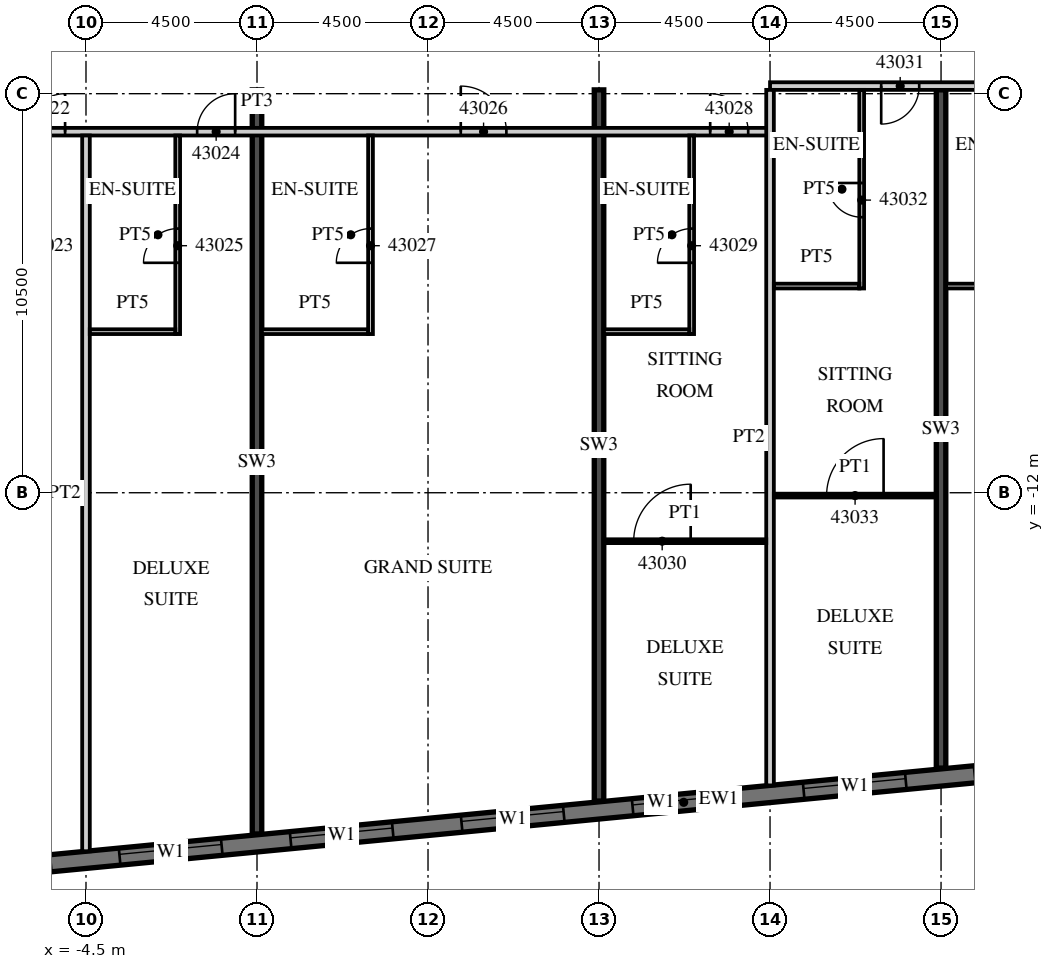
"""IFC4 building model, lengths in metres.
Left out: names, types, materials, properties, quantities, classifications, styles, units other than length and angle.
Written with IfcOpenShell. Run it as: python <this file> out.ifc"""

import sys

from ifc_helpers import new_model, si_unit, direction, frame, frame_2d, origin, place, context, subcontext, project, spatial, rectangle, extrude, element, fill, save


model = new_model("IFC4")
c1 = context("Model", 3, precision=1e-05, world=origin(), true_north=direction((0.0, 1.0)))
c2 = subcontext(c1, "Body", "Model", "MODEL_VIEW")
j1 = project(units=[si_unit("LENGTHUNIT", "METRE"), si_unit("PLANEANGLEUNIT", "RADIAN")], contexts=[c1])
p1 = place(None, origin())
s1 = spatial("IfcSite", under=j1, at=p1, CompositionType="ELEMENT")
p2 = place(p1, origin())
s2 = spatial("IfcBuilding", under=s1, at=p2, CompositionType="ELEMENT")
p3 = place(p2, frame((0.0, 0.0, 183.4)))
s3 = spatial("IfcBuildingStorey", under=s2, at=p3, CompositionType="ELEMENT", Elevation=183.4)
p4 = place(p3, frame((0.0, -20.979, 0.0), z_axis=(0.0, 0.0, 1.0), x_axis=(0.0, 1.0, 0.0)))
e1 = element("IfcWall", 1, at=p4, inside=s3, PredefinedType="SHEAR", context=c2, shape_type="SweptSolid", body=[
    extrude(rectangle(XDim=19.579, YDim=0.25, at=frame_2d((9.789, 0.0))), origin(), (0.0, 0.0, 1.0), 3.3),
])
p5 = place(p3, frame((9.0, -20.112, 0.0), z_axis=(0.0, 0.0, 1.0), x_axis=(0.0, 1.0, 0.0)))
e2 = element("IfcWall", 2, at=p5, inside=s3, PredefinedType="SHEAR", context=c2, shape_type="SweptSolid", body=[
    extrude(rectangle(XDim=18.712, YDim=0.25, at=frame_2d((9.356, 0.0))), origin(), (0.0, 0.0, 1.0), 3.3),
])
p6 = place(p3, frame((18.0, -19.245, 0.0), z_axis=(0.0, 0.0, 1.0), x_axis=(0.0, 1.0, 0.0)))
e3 = element("IfcWall", 3, at=p6, inside=s3, PredefinedType="SHEAR", context=c2, shape_type="SweptSolid", body=[
    extrude(rectangle(XDim=17.845, YDim=0.25, at=frame_2d((8.923, 0.0))), origin(), (0.0, 0.0, 1.0), 3.3),
])
p7 = place(p3, frame((-13.521, -22.529, 0.0), z_axis=(0.0, 0.0, 1.0), x_axis=(0.995396436651, 0.095843277819, 0.0)))
e4 = element("IfcWall", 4, at=p7, inside=s3, PredefinedType="SOLIDWALL", context=c2, shape_type="SweptSolid", body=[
    extrude(rectangle(XDim=51.578, YDim=0.45, at=frame_2d((25.789, 0.0))), origin(), (0.0, 0.0, 1.0), 3.02),
])
p8 = place(p7, frame((0.91, 0.0, 0.45)))
e5 = element("IfcOpeningElement", 5, at=p8, cuts=e4, PredefinedType="OPENING", context=c2, shape_type="SweptSolid", body=[
    extrude(rectangle(XDim=2.7, YDim=2.25, at=frame_2d((1.35, 1.125))), frame((0.0, 0.235, 0.0), z_axis=(0.0, -1.0, 0.0), x_axis=(1.0, 0.0, 0.0)), (0.0, 0.0, 1.0), 0.47),
])
p9 = place(p7, frame((5.431, 0.0, 0.45)))
e6 = element("IfcOpeningElement", 6, at=p9, cuts=e4, PredefinedType="OPENING", context=c2, shape_type="SweptSolid", body=[
    extrude(rectangle(XDim=2.7, YDim=2.25, at=frame_2d((1.35, 1.125))), frame((0.0, 0.235, 0.0), z_axis=(0.0, -1.0, 0.0), x_axis=(1.0, 0.0, 0.0)), (0.0, 0.0, 1.0), 0.47),
])
p10 = place(p7, frame((9.952, 0.0, 0.45)))
e7 = element("IfcOpeningElement", 7, at=p10, cuts=e4, PredefinedType="OPENING", context=c2, shape_type="SweptSolid", body=[
    extrude(rectangle(XDim=2.7, YDim=2.25, at=frame_2d((1.35, 1.125))), frame((0.0, 0.235, 0.0), z_axis=(0.0, -1.0, 0.0), x_axis=(1.0, 0.0, 0.0)), (0.0, 0.0, 1.0), 0.47),
])
p11 = place(p7, frame((14.473, 0.0, 0.45)))
e8 = element("IfcOpeningElement", 8, at=p11, cuts=e4, PredefinedType="OPENING", context=c2, shape_type="SweptSolid", body=[
    extrude(rectangle(XDim=2.7, YDim=2.25, at=frame_2d((1.35, 1.125))), frame((0.0, 0.235, 0.0), z_axis=(0.0, -1.0, 0.0), x_axis=(1.0, 0.0, 0.0)), (0.0, 0.0, 1.0), 0.47),
])
p12 = place(p7, frame((18.994, 0.0, 0.45)))
e9 = element("IfcOpeningElement", 9, at=p12, cuts=e4, PredefinedType="OPENING", context=c2, shape_type="SweptSolid", body=[
    extrude(rectangle(XDim=2.7, YDim=2.25, at=frame_2d((1.35, 1.125))), frame((0.0, 0.235, 0.0), z_axis=(0.0, -1.0, 0.0), x_axis=(1.0, 0.0, 0.0)), (0.0, 0.0, 1.0), 0.47),
])
p13 = place(p7, frame((23.514, 0.0, 0.45)))
e10 = element("IfcOpeningElement", 10, at=p13, cuts=e4, PredefinedType="OPENING", context=c2, shape_type="SweptSolid", body=[
    extrude(rectangle(XDim=2.7, YDim=2.25, at=frame_2d((1.35, 1.125))), frame((0.0, 0.235, 0.0), z_axis=(0.0, -1.0, 0.0), x_axis=(1.0, 0.0, 0.0)), (0.0, 0.0, 1.0), 0.47),
])
p14 = place(p7, frame((28.035, 0.0, 0.45)))
e11 = element("IfcOpeningElement", 11, at=p14, cuts=e4, PredefinedType="OPENING", context=c2, shape_type="SweptSolid", body=[
    extrude(rectangle(XDim=2.7, YDim=2.25, at=frame_2d((1.35, 1.125))), frame((0.0, 0.235, 0.0), z_axis=(0.0, -1.0, 0.0), x_axis=(1.0, 0.0, 0.0)), (0.0, 0.0, 1.0), 0.47),
])
p15 = place(p7, frame((32.556, 0.0, 0.45)))
e12 = element("IfcOpeningElement", 12, at=p15, cuts=e4, PredefinedType="OPENING", context=c2, shape_type="SweptSolid", body=[
    extrude(rectangle(XDim=2.7, YDim=2.25, at=frame_2d((1.35, 1.125))), frame((0.0, 0.235, 0.0), z_axis=(0.0, -1.0, 0.0), x_axis=(1.0, 0.0, 0.0)), (0.0, 0.0, 1.0), 0.47),
])
p16 = place(p7, frame((37.077, 0.0, 0.45)))
e13 = element("IfcOpeningElement", 13, at=p16, cuts=e4, PredefinedType="OPENING", context=c2, shape_type="SweptSolid", body=[
    extrude(rectangle(XDim=2.7, YDim=2.25, at=frame_2d((1.35, 1.125))), frame((0.0, 0.235, 0.0), z_axis=(0.0, -1.0, 0.0), x_axis=(1.0, 0.0, 0.0)), (0.0, 0.0, 1.0), 0.47),
])
p17 = place(p7, frame((41.598, 0.0, 0.45)))
e14 = element("IfcOpeningElement", 14, at=p17, cuts=e4, PredefinedType="OPENING", context=c2, shape_type="SweptSolid", body=[
    extrude(rectangle(XDim=2.7, YDim=2.25, at=frame_2d((1.35, 1.125))), frame((0.0, 0.235, 0.0), z_axis=(0.0, -1.0, 0.0), x_axis=(1.0, 0.0, 0.0)), (0.0, 0.0, 1.0), 0.47),
])
p18 = place(p7, frame((46.119, 0.0, 0.45)))
e15 = element("IfcOpeningElement", 15, at=p18, cuts=e4, PredefinedType="OPENING", context=c2, shape_type="SweptSolid", body=[
    extrude(rectangle(XDim=2.7, YDim=2.25, at=frame_2d((1.35, 1.125))), frame((0.0, 0.235, 0.0), z_axis=(0.0, -1.0, 0.0), x_axis=(1.0, 0.0, 0.0)), (0.0, 0.0, 1.0), 0.47),
])
p19 = place(p3, frame((-13.5, -2.5, 0.0), z_axis=(0.0, 0.0, 1.0), x_axis=(1.0, 0.0, 0.0)))
e16 = element("IfcWall", 16, at=p19, inside=s3, PredefinedType="PARTITIONING", context=c2, shape_type="SweptSolid", body=[
    extrude(rectangle(XDim=27.0, YDim=0.2, at=frame_2d((13.5, 0.0))), origin(), (0.0, 0.0, 1.0), 3.02),
])
p20 = place(p19, frame((2.925, 0.0, 0.0)))
e17 = element("IfcOpeningElement", 17, at=p20, cuts=e16, PredefinedType="OPENING", context=c2, shape_type="SweptSolid", body=[
    extrude(rectangle(XDim=1.0, YDim=2.1, at=frame_2d((0.5, 1.05))), frame((0.0, 0.11, 0.0), z_axis=(0.0, -1.0, 0.0), x_axis=(1.0, 0.0, 0.0)), (0.0, 0.0, 1.0), 0.22),
])
p21 = place(p19, frame((7.45, 0.0, 0.0)))
e18 = element("IfcOpeningElement", 18, at=p21, cuts=e16, PredefinedType="OPENING", context=c2, shape_type="SweptSolid", body=[
    extrude(rectangle(XDim=1.0, YDim=2.1, at=frame_2d((0.5, 1.05))), frame((0.0, 0.11, 0.0), z_axis=(0.0, -1.0, 0.0), x_axis=(1.0, 0.0, 0.0)), (0.0, 0.0, 1.0), 0.22),
])
p22 = place(p19, frame((11.925, 0.0, 0.0)))
e19 = element("IfcOpeningElement", 19, at=p22, cuts=e16, PredefinedType="OPENING", context=c2, shape_type="SweptSolid", body=[
    extrude(rectangle(XDim=1.0, YDim=2.1, at=frame_2d((0.5, 1.05))), frame((0.0, 0.11, 0.0), z_axis=(0.0, -1.0, 0.0), x_axis=(1.0, 0.0, 0.0)), (0.0, 0.0, 1.0), 0.22),
])
p23 = place(p19, frame((18.862, 0.0, 0.0)))
e20 = element("IfcOpeningElement", 20, at=p23, cuts=e16, PredefinedType="OPENING", context=c2, shape_type="SweptSolid", body=[
    extrude(rectangle(XDim=1.2, YDim=2.1, at=frame_2d((0.6, 1.05))), frame((0.0, 0.11, 0.0), z_axis=(0.0, -1.0, 0.0), x_axis=(1.0, 0.0, 0.0)), (0.0, 0.0, 1.0), 0.22),
])
p24 = place(p19, frame((25.425, 0.0, 0.0)))
e21 = element("IfcOpeningElement", 21, at=p24, cuts=e16, PredefinedType="OPENING", context=c2, shape_type="SweptSolid", body=[
    extrude(rectangle(XDim=1.0, YDim=2.1, at=frame_2d((0.5, 1.05))), frame((0.0, 0.11, 0.0), z_axis=(0.0, -1.0, 0.0), x_axis=(1.0, 0.0, 0.0)), (0.0, 0.0, 1.0), 0.22),
])
p25 = place(p3, frame((13.5, -1.3, 0.0), z_axis=(0.0, 0.0, 1.0), x_axis=(1.0, 0.0, 0.0)))
e22 = element("IfcWall", 22, at=p25, inside=s3, PredefinedType="PARTITIONING", context=c2, shape_type="SweptSolid", body=[
    extrude(rectangle(XDim=26.317, YDim=0.2, at=frame_2d((13.158, 0.0))), origin(), (0.0, 0.0, 1.0), 3.02),
])
p26 = place(p25, frame((2.925, 0.0, 0.0)))
e23 = element("IfcOpeningElement", 23, at=p26, cuts=e22, PredefinedType="OPENING", context=c2, shape_type="SweptSolid", body=[
    extrude(rectangle(XDim=1.0, YDim=2.1, at=frame_2d((0.5, 1.05))), frame((0.0, 0.11, 0.0), z_axis=(0.0, -1.0, 0.0), x_axis=(1.0, 0.0, 0.0)), (0.0, 0.0, 1.0), 0.22),
])
p27 = place(p25, frame((9.862, 0.0, 0.0)))
e24 = element("IfcOpeningElement", 24, at=p27, cuts=e22, PredefinedType="OPENING", context=c2, shape_type="SweptSolid", body=[
    extrude(rectangle(XDim=1.2, YDim=2.1, at=frame_2d((0.6, 1.05))), frame((0.0, 0.11, 0.0), z_axis=(0.0, -1.0, 0.0), x_axis=(1.0, 0.0, 0.0)), (0.0, 0.0, 1.0), 0.22),
])
p28 = place(p25, frame((15.938, 0.0, 0.0)))
e25 = element("IfcOpeningElement", 25, at=p28, cuts=e22, PredefinedType="OPENING", context=c2, shape_type="SweptSolid", body=[
    extrude(rectangle(XDim=1.2, YDim=2.1, at=frame_2d((0.6, 1.05))), frame((0.0, 0.11, 0.0), z_axis=(0.0, -1.0, 0.0), x_axis=(1.0, 0.0, 0.0)), (0.0, 0.0, 1.0), 0.22),
])
p29 = place(p25, frame((25.208, 0.0, 0.0)))
e26 = element("IfcOpeningElement", 26, at=p29, cuts=e22, PredefinedType="OPENING", context=c2, shape_type="SweptSolid", body=[
    extrude(rectangle(XDim=0.9, YDim=2.1, at=frame_2d((0.45, 1.05))), frame((0.0, 0.11, 0.0), z_axis=(0.0, -1.0, 0.0), x_axis=(1.0, 0.0, 0.0)), (0.0, 0.0, 1.0), 0.22),
])
p30 = place(p3, frame((-4.5, -21.434, 0.0), z_axis=(0.0, 0.0, 1.0), x_axis=(0.0, 1.0, 0.0)))
e27 = element("IfcWall", 27, at=p30, inside=s3, PredefinedType="PARTITIONING", context=c2, shape_type="SweptSolid", body=[
    extrude(rectangle(XDim=18.834, YDim=0.2, at=frame_2d((9.417, 0.0))), origin(), (0.0, 0.0, 1.0), 3.02),
])
p31 = place(p3, frame((-2.087, -7.825, 0.0), z_axis=(0.0, 0.0, 1.0), x_axis=(0.0, 1.0, 0.0)))
e28 = element("IfcWall", 28, at=p31, inside=s3, PredefinedType="PARTITIONING", context=c2, shape_type="SweptSolid", body=[
    extrude(rectangle(XDim=5.225, YDim=0.125, at=frame_2d((2.612, 0.0))), origin(), (0.0, 0.0, 1.0), 3.02),
])
p32 = place(p31, frame((1.875, 0.0, 0.0)))
e29 = element("IfcOpeningElement", 29, at=p32, cuts=e28, PredefinedType="OPENING", context=c2, shape_type="SweptSolid", body=[
    extrude(rectangle(XDim=0.9, YDim=2.1, at=frame_2d((0.45, 1.05))), frame((0.0, 0.073, 0.0), z_axis=(0.0, -1.0, 0.0), x_axis=(1.0, 0.0, 0.0)), (0.0, 0.0, 1.0), 0.145),
])
p33 = place(p3, frame((-4.4, -7.762, 0.0), z_axis=(0.0, 0.0, 1.0), x_axis=(1.0, 0.0, 0.0)))
e30 = element("IfcWall", 30, at=p33, inside=s3, PredefinedType="PARTITIONING", context=c2, shape_type="SweptSolid", body=[
    extrude(rectangle(XDim=2.25, YDim=0.125, at=frame_2d((1.125, 0.0))), origin(), (0.0, 0.0, 1.0), 3.02),
])
p34 = place(p3, frame((2.987, -7.825, 0.0), z_axis=(0.0, 0.0, 1.0), x_axis=(0.0, 1.0, 0.0)))
e31 = element("IfcWall", 31, at=p34, inside=s3, PredefinedType="PARTITIONING", context=c2, shape_type="SweptSolid", body=[
    extrude(rectangle(XDim=5.225, YDim=0.125, at=frame_2d((2.612, 0.0))), origin(), (0.0, 0.0, 1.0), 3.02),
])
p35 = place(p34, frame((1.875, 0.0, 0.0)))
e32 = element("IfcOpeningElement", 32, at=p35, cuts=e31, PredefinedType="OPENING", context=c2, shape_type="SweptSolid", body=[
    extrude(rectangle(XDim=0.9, YDim=2.1, at=frame_2d((0.45, 1.05))), frame((0.0, 0.073, 0.0), z_axis=(0.0, -1.0, 0.0), x_axis=(1.0, 0.0, 0.0)), (0.0, 0.0, 1.0), 0.145),
])
p36 = place(p3, frame((0.125, -7.762, 0.0), z_axis=(0.0, 0.0, 1.0), x_axis=(1.0, 0.0, 0.0)))
e33 = element("IfcWall", 33, at=p36, inside=s3, PredefinedType="PARTITIONING", context=c2, shape_type="SweptSolid", body=[
    extrude(rectangle(XDim=2.8, YDim=0.125, at=frame_2d((1.4, 0.0))), origin(), (0.0, 0.0, 1.0), 3.02),
])
p37 = place(p3, frame((13.5, -19.701, 0.0), z_axis=(0.0, 0.0, 1.0), x_axis=(0.0, 1.0, 0.0)))
e34 = element("IfcWall", 34, at=p37, inside=s3, PredefinedType="PARTITIONING", context=c2, shape_type="SweptSolid", body=[
    extrude(rectangle(XDim=18.301, YDim=0.2, at=frame_2d((9.15, 0.0))), origin(), (0.0, 0.0, 1.0), 3.02),
])
p38 = place(p3, frame((11.438, -7.825, 0.0), z_axis=(0.0, 0.0, 1.0), x_axis=(0.0, 1.0, 0.0)))
e35 = element("IfcWall", 35, at=p38, inside=s3, PredefinedType="PARTITIONING", context=c2, shape_type="SweptSolid", body=[
    extrude(rectangle(XDim=5.225, YDim=0.125, at=frame_2d((2.612, 0.0))), origin(), (0.0, 0.0, 1.0), 3.02),
])
p39 = place(p38, frame((1.875, 0.0, 0.0)))
e36 = element("IfcOpeningElement", 36, at=p39, cuts=e35, PredefinedType="OPENING", context=c2, shape_type="SweptSolid", body=[
    extrude(rectangle(XDim=0.9, YDim=2.1, at=frame_2d((0.45, 1.05))), frame((0.0, 0.073, 0.0), z_axis=(0.0, -1.0, 0.0), x_axis=(1.0, 0.0, 0.0)), (0.0, 0.0, 1.0), 0.145),
])
p40 = place(p3, frame((9.125, -7.762, 0.0), z_axis=(0.0, 0.0, 1.0), x_axis=(1.0, 0.0, 0.0)))
e37 = element("IfcWall", 37, at=p40, inside=s3, PredefinedType="PARTITIONING", context=c2, shape_type="SweptSolid", body=[
    extrude(rectangle(XDim=2.25, YDim=0.125, at=frame_2d((1.125, 0.0))), origin(), (0.0, 0.0, 1.0), 3.02),
])
p41 = place(p3, frame((9.125, -13.275, 0.0), z_axis=(0.0, 0.0, 1.0), x_axis=(1.0, 0.0, 0.0)))
e38 = element("IfcWall", 38, at=p41, inside=s3, PredefinedType="PARTITIONING", context=c2, shape_type="SweptSolid", body=[
    extrude(rectangle(XDim=4.275, YDim=0.1, at=frame_2d((2.137, 0.0))), origin(), (0.0, 0.0, 1.0), 3.02),
])
p42 = place(p41, frame((0.787, 0.0, 0.0)))
e39 = element("IfcOpeningElement", 39, at=p42, cuts=e38, PredefinedType="OPENING", context=c2, shape_type="SweptSolid", body=[
    extrude(rectangle(XDim=1.5, YDim=2.1, at=frame_2d((0.75, 1.05))), frame((0.0, 0.06, 0.0), z_axis=(0.0, -1.0, 0.0), x_axis=(1.0, 0.0, 0.0)), (0.0, 0.0, 1.0), 0.12),
])
p43 = place(p3, frame((15.912, -6.625, 0.0), z_axis=(0.0, 0.0, 1.0), x_axis=(0.0, 1.0, 0.0)))
e40 = element("IfcWall", 40, at=p43, inside=s3, PredefinedType="PARTITIONING", context=c2, shape_type="SweptSolid", body=[
    extrude(rectangle(XDim=5.225, YDim=0.125, at=frame_2d((2.613, 0.0))), origin(), (0.0, 0.0, 1.0), 3.02),
])
p44 = place(p43, frame((1.875, 0.0, 0.0)))
e41 = element("IfcOpeningElement", 41, at=p44, cuts=e40, PredefinedType="OPENING", context=c2, shape_type="SweptSolid", body=[
    extrude(rectangle(XDim=0.9, YDim=2.1, at=frame_2d((0.45, 1.05))), frame((0.0, 0.073, 0.0), z_axis=(0.0, -1.0, 0.0), x_axis=(1.0, 0.0, 0.0)), (0.0, 0.0, 1.0), 0.145),
])
p45 = place(p3, frame((13.6, -6.562, 0.0), z_axis=(0.0, 0.0, 1.0), x_axis=(1.0, 0.0, 0.0)))
e42 = element("IfcWall", 42, at=p45, inside=s3, PredefinedType="PARTITIONING", context=c2, shape_type="SweptSolid", body=[
    extrude(rectangle(XDim=2.25, YDim=0.125, at=frame_2d((1.125, 0.0))), origin(), (0.0, 0.0, 1.0), 3.02),
])
p46 = place(p3, frame((13.6, -12.075, 0.0), z_axis=(0.0, 0.0, 1.0), x_axis=(1.0, 0.0, 0.0)))
e43 = element("IfcWall", 43, at=p46, inside=s3, PredefinedType="PARTITIONING", context=c2, shape_type="SweptSolid", body=[
    extrude(rectangle(XDim=4.275, YDim=0.1, at=frame_2d((2.137, 0.0))), origin(), (0.0, 0.0, 1.0), 3.02),
])
p47 = place(p46, frame((1.388, 0.0, 0.0)))
e44 = element("IfcOpeningElement", 44, at=p47, cuts=e43, PredefinedType="OPENING", context=c2, shape_type="SweptSolid", body=[
    extrude(rectangle(XDim=1.5, YDim=2.1, at=frame_2d((0.75, 1.05))), frame((0.0, 0.06, 0.0), z_axis=(0.0, -1.0, 0.0), x_axis=(1.0, 0.0, 0.0)), (0.0, 0.0, 1.0), 0.12),
])
p48 = place(p3, frame((18.125, -6.562, 0.0), z_axis=(0.0, 0.0, 1.0), x_axis=(1.0, 0.0, 0.0)))
e45 = element("IfcWall", 45, at=p48, inside=s3, PredefinedType="PARTITIONING", context=c2, shape_type="SweptSolid", body=[
    extrude(rectangle(XDim=2.8, YDim=0.125, at=frame_2d((1.4, 0.0))), origin(), (0.0, 0.0, 1.0), 3.02),
])
p49 = place(p10, origin())
e46 = element("IfcWindow", 46, at=p49, inside=s3, PartitioningType="SINGLE_PANEL", PredefinedType="WINDOW", context=c2, shape_type="SweptSolid", body=[
    extrude(rectangle(XDim=2.7, YDim=2.25, at=frame_2d((1.35, 1.125))), frame((0.0, 0.09, 0.0), z_axis=(0.0, -1.0, 0.0), x_axis=(1.0, 0.0, 0.0)), (0.0, 0.0, 1.0), 0.06),
])
fill(e7, e46)
p50 = place(p11, origin())
e47 = element("IfcWindow", 47, at=p50, inside=s3, PartitioningType="SINGLE_PANEL", PredefinedType="WINDOW", context=c2, shape_type="SweptSolid", body=[
    extrude(rectangle(XDim=2.7, YDim=2.25, at=frame_2d((1.35, 1.125))), frame((0.0, 0.09, 0.0), z_axis=(0.0, -1.0, 0.0), x_axis=(1.0, 0.0, 0.0)), (0.0, 0.0, 1.0), 0.06),
])
fill(e8, e47)
p51 = place(p12, origin())
e48 = element("IfcWindow", 48, at=p51, inside=s3, PartitioningType="SINGLE_PANEL", PredefinedType="WINDOW", context=c2, shape_type="SweptSolid", body=[
    extrude(rectangle(XDim=2.7, YDim=2.25, at=frame_2d((1.35, 1.125))), frame((0.0, 0.09, 0.0), z_axis=(0.0, -1.0, 0.0), x_axis=(1.0, 0.0, 0.0)), (0.0, 0.0, 1.0), 0.06),
])
fill(e9, e48)
p52 = place(p13, origin())
e49 = element("IfcWindow", 49, at=p52, inside=s3, PartitioningType="SINGLE_PANEL", PredefinedType="WINDOW", context=c2, shape_type="SweptSolid", body=[
    extrude(rectangle(XDim=2.7, YDim=2.25, at=frame_2d((1.35, 1.125))), frame((0.0, 0.09, 0.0), z_axis=(0.0, -1.0, 0.0), x_axis=(1.0, 0.0, 0.0)), (0.0, 0.0, 1.0), 0.06),
])
fill(e10, e49)
p53 = place(p14, origin())
e50 = element("IfcWindow", 50, at=p53, inside=s3, PartitioningType="SINGLE_PANEL", PredefinedType="WINDOW", context=c2, shape_type="SweptSolid", body=[
    extrude(rectangle(XDim=2.7, YDim=2.25, at=frame_2d((1.35, 1.125))), frame((0.0, 0.09, 0.0), z_axis=(0.0, -1.0, 0.0), x_axis=(1.0, 0.0, 0.0)), (0.0, 0.0, 1.0), 0.06),
])
fill(e11, e50)
p54 = place(p21, origin())
e51 = element("IfcDoor", 51, at=p54, inside=s3, OperationType="SINGLE_SWING_RIGHT", PredefinedType="DOOR", context=c2, shape_type="SweptSolid", body=[
    extrude(rectangle(XDim=1.0, YDim=2.1, at=frame_2d((0.5, 1.05))), frame((0.0, 0.025, 0.0), z_axis=(0.0, -1.0, 0.0), x_axis=(1.0, 0.0, 0.0)), (0.0, 0.0, 1.0), 0.05),
])
fill(e18, e51)
p55 = place(p22, origin())
e52 = element("IfcDoor", 52, at=p55, inside=s3, OperationType="SINGLE_SWING_RIGHT", PredefinedType="DOOR", context=c2, shape_type="SweptSolid", body=[
    extrude(rectangle(XDim=1.0, YDim=2.1, at=frame_2d((0.5, 1.05))), frame((0.0, 0.025, 0.0), z_axis=(0.0, -1.0, 0.0), x_axis=(1.0, 0.0, 0.0)), (0.0, 0.0, 1.0), 0.05),
])
fill(e19, e52)
p56 = place(p32, origin())
e53 = element("IfcDoor", 53, at=p56, inside=s3, OperationType="SINGLE_SWING_LEFT", PredefinedType="DOOR", context=c2, shape_type="SweptSolid", body=[
    extrude(rectangle(XDim=0.9, YDim=2.1, at=frame_2d((0.45, 1.05))), frame((0.0, 0.025, 0.0), z_axis=(0.0, -1.0, 0.0), x_axis=(1.0, 0.0, 0.0)), (0.0, 0.0, 1.0), 0.05),
])
fill(e29, e53)
p57 = place(p23, origin())
e54 = element("IfcDoor", 54, at=p57, inside=s3, OperationType="SINGLE_SWING_LEFT", PredefinedType="DOOR", context=c2, shape_type="SweptSolid", body=[
    extrude(rectangle(XDim=1.2, YDim=2.1, at=frame_2d((0.6, 1.05))), frame((0.0, 0.025, 0.0), z_axis=(0.0, -1.0, 0.0), x_axis=(1.0, 0.0, 0.0)), (0.0, 0.0, 1.0), 0.05),
])
fill(e20, e54)
p58 = place(p35, origin())
e55 = element("IfcDoor", 55, at=p58, inside=s3, OperationType="SINGLE_SWING_LEFT", PredefinedType="DOOR", context=c2, shape_type="SweptSolid", body=[
    extrude(rectangle(XDim=0.9, YDim=2.1, at=frame_2d((0.45, 1.05))), frame((0.0, 0.025, 0.0), z_axis=(0.0, -1.0, 0.0), x_axis=(1.0, 0.0, 0.0)), (0.0, 0.0, 1.0), 0.05),
])
fill(e32, e55)
p59 = place(p24, origin())
e56 = element("IfcDoor", 56, at=p59, inside=s3, OperationType="SINGLE_SWING_LEFT", PredefinedType="DOOR", context=c2, shape_type="SweptSolid", body=[
    extrude(rectangle(XDim=1.0, YDim=2.1, at=frame_2d((0.5, 1.05))), frame((0.0, 0.025, 0.0), z_axis=(0.0, -1.0, 0.0), x_axis=(1.0, 0.0, 0.0)), (0.0, 0.0, 1.0), 0.05),
])
fill(e21, e56)
p60 = place(p39, origin())
e57 = element("IfcDoor", 57, at=p60, inside=s3, OperationType="SINGLE_SWING_LEFT", PredefinedType="DOOR", context=c2, shape_type="SweptSolid", body=[
    extrude(rectangle(XDim=0.9, YDim=2.1, at=frame_2d((0.45, 1.05))), frame((0.0, 0.025, 0.0), z_axis=(0.0, -1.0, 0.0), x_axis=(1.0, 0.0, 0.0)), (0.0, 0.0, 1.0), 0.05),
])
fill(e36, e57)
p61 = place(p42, origin())
e58 = element("IfcDoor", 58, at=p61, inside=s3, OperationType="SINGLE_SWING_RIGHT", PredefinedType="DOOR", context=c2, shape_type="SweptSolid", body=[
    extrude(rectangle(XDim=1.5, YDim=2.1, at=frame_2d((0.75, 1.05))), frame((0.0, 0.025, 0.0), z_axis=(0.0, -1.0, 0.0), x_axis=(1.0, 0.0, 0.0)), (0.0, 0.0, 1.0), 0.05),
])
fill(e39, e58)
p62 = place(p26, origin())
e59 = element("IfcDoor", 59, at=p62, inside=s3, OperationType="SINGLE_SWING_LEFT", PredefinedType="DOOR", context=c2, shape_type="SweptSolid", body=[
    extrude(rectangle(XDim=1.0, YDim=2.1, at=frame_2d((0.5, 1.05))), frame((0.0, 0.025, 0.0), z_axis=(0.0, -1.0, 0.0), x_axis=(1.0, 0.0, 0.0)), (0.0, 0.0, 1.0), 0.05),
])
fill(e23, e59)
p63 = place(p44, origin())
e60 = element("IfcDoor", 60, at=p63, inside=s3, OperationType="SINGLE_SWING_RIGHT", PredefinedType="DOOR", context=c2, shape_type="SweptSolid", body=[
    extrude(rectangle(XDim=0.9, YDim=2.1, at=frame_2d((0.45, 1.05))), frame((0.0, 0.025, 0.0), z_axis=(0.0, -1.0, 0.0), x_axis=(1.0, 0.0, 0.0)), (0.0, 0.0, 1.0), 0.05),
])
fill(e41, e60)
p64 = place(p47, origin())
e61 = element("IfcDoor", 61, at=p64, inside=s3, OperationType="SINGLE_SWING_RIGHT", PredefinedType="DOOR", context=c2, shape_type="SweptSolid", body=[
    extrude(rectangle(XDim=1.5, YDim=2.1, at=frame_2d((0.75, 1.05))), frame((0.0, 0.025, 0.0), z_axis=(0.0, -1.0, 0.0), x_axis=(1.0, 0.0, 0.0)), (0.0, 0.0, 1.0), 0.05),
])
fill(e44, e61)
save(model, sys.argv[1])
